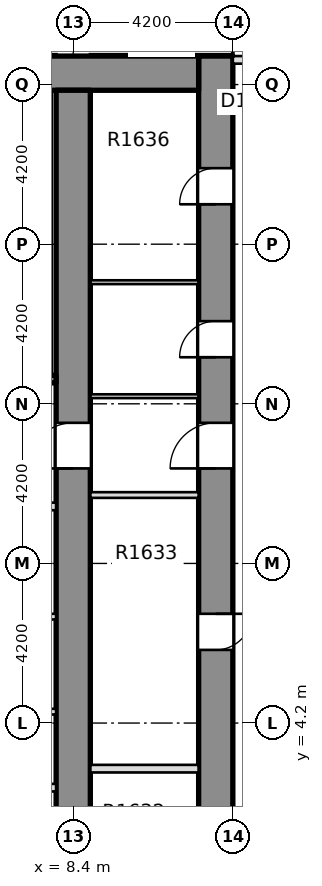
"""IFC4 building model, lengths in metres.
Left out: names, types, materials, properties, quantities, classifications, styles, units other than length and angle.
Written with IfcOpenShell. Run it as: python <this file> out.ifc"""

import sys

from ifc_helpers import new_model, si_unit, direction, frame, frame_2d, origin, place, context, subcontext, project, spatial, rectangle, extrude, element, fill, save


model = new_model("IFC4")
c1 = context("Model", 3, precision=1e-05, world=origin(), true_north=direction((0.0, 1.0)))
c2 = subcontext(c1, "Body", "Model", "MODEL_VIEW")
j1 = project(units=[si_unit("LENGTHUNIT", "METRE"), si_unit("PLANEANGLEUNIT", "RADIAN")], contexts=[c1])
p1 = place(None, origin())
s1 = spatial("IfcSite", under=j1, at=p1, CompositionType="ELEMENT")
p2 = place(p1, origin())
s2 = spatial("IfcBuilding", under=s1, at=p2, CompositionType="ELEMENT")
p3 = place(p2, frame((0.0, 0.0, 69.0)))
s3 = spatial("IfcBuildingStorey", under=s2, at=p3, CompositionType="ELEMENT", Elevation=69.0)
p4 = place(p3, frame((12.15, -8.4, -0.32), z_axis=(0.0, 0.0, 1.0), x_axis=(0.0, 1.0, 0.0)))
e1 = element("IfcWall", 1, at=p4, inside=s3, PredefinedType="SHEAR", context=c2, shape_type="SweptSolid", body=[
    extrude(rectangle(XDim=30.15, YDim=0.9, at=frame_2d((15.075, 0.0))), origin(), (0.0, 0.0, 1.0), 3.45),
])
p5 = place(p4, frame((3.925, 0.0, 0.32)))
e2 = element("IfcOpeningElement", 2, at=p5, cuts=e1, PredefinedType="OPENING", context=c2, shape_type="SweptSolid", body=[
    extrude(rectangle(XDim=0.95, YDim=2.1, at=frame_2d((0.475, 1.05))), frame((0.0, 0.46, 0.0), z_axis=(0.0, -1.0, 0.0), x_axis=(1.0, 0.0, 0.0)), (0.0, 0.0, 1.0), 0.92),
])
p6 = place(p4, frame((9.175, 0.0, 0.32)))
e3 = element("IfcOpeningElement", 3, at=p6, cuts=e1, PredefinedType="OPENING", context=c2, shape_type="SweptSolid", body=[
    extrude(rectangle(XDim=0.95, YDim=2.1, at=frame_2d((0.475, 1.05))), frame((0.0, 0.46, 0.0), z_axis=(0.0, -1.0, 0.0), x_axis=(1.0, 0.0, 0.0)), (0.0, 0.0, 1.0), 0.92),
])
p7 = place(p4, frame((14.525, 0.0, 0.32)))
e4 = element("IfcOpeningElement", 4, at=p7, cuts=e1, PredefinedType="OPENING", context=c2, shape_type="SweptSolid", body=[
    extrude(rectangle(XDim=0.95, YDim=2.1, at=frame_2d((0.475, 1.05))), frame((0.0, 0.46, 0.0), z_axis=(0.0, -1.0, 0.0), x_axis=(1.0, 0.0, 0.0)), (0.0, 0.0, 1.0), 0.92),
])
p8 = place(p4, frame((22.225, 0.0, 0.32)))
e5 = element("IfcOpeningElement", 5, at=p8, cuts=e1, PredefinedType="OPENING", context=c2, shape_type="SweptSolid", body=[
    extrude(rectangle(XDim=0.95, YDim=2.1, at=frame_2d((0.475, 1.05))), frame((0.0, 0.46, 0.0), z_axis=(0.0, -1.0, 0.0), x_axis=(1.0, 0.0, 0.0)), (0.0, 0.0, 1.0), 0.92),
])
p9 = place(p4, frame((26.25, 0.0, 0.32)))
e6 = element("IfcOpeningElement", 6, at=p9, cuts=e1, PredefinedType="OPENING", context=c2, shape_type="SweptSolid", body=[
    extrude(rectangle(XDim=0.95, YDim=2.1, at=frame_2d((0.475, 1.05))), frame((0.0, 0.46, 0.0), z_axis=(0.0, -1.0, 0.0), x_axis=(1.0, 0.0, 0.0)), (0.0, 0.0, 1.0), 0.92),
])
p10 = place(p4, frame((19.3, 0.0, 0.32)))
e7 = element("IfcOpeningElement", 7, at=p10, cuts=e1, PredefinedType="OPENING", context=c2, shape_type="SweptSolid", body=[
    extrude(rectangle(XDim=1.2, YDim=2.1, at=frame_2d((0.6, 1.05))), frame((0.0, 0.46, 0.0), z_axis=(0.0, -1.0, 0.0), x_axis=(1.0, 0.0, 0.0)), (0.0, 0.0, 1.0), 0.92),
])
p11 = place(p3, frame((-11.7, 21.3, -0.32), z_axis=(0.0, 0.0, 1.0), x_axis=(1.0, 0.0, 0.0)))
e8 = element("IfcWall", 8, at=p11, inside=s3, PredefinedType="SOLIDWALL", context=c2, shape_type="SweptSolid", body=[
    extrude(rectangle(XDim=23.4, YDim=0.9, at=frame_2d((11.7, 0.0))), origin(), (0.0, 0.0, 1.0), 3.45),
])
p12 = place(p3, frame((8.4, -7.5, -0.32), z_axis=(0.0, 0.0, 1.0), x_axis=(0.0, 1.0, 0.0)))
e9 = element("IfcWall", 9, at=p12, inside=s3, PredefinedType="SHEAR", context=c2, shape_type="SweptSolid", body=[
    extrude(rectangle(XDim=28.35, YDim=0.9, at=frame_2d((14.175, 0.0))), origin(), (0.0, 0.0, 1.0), 3.45),
])
p13 = place(p12, frame((18.4, 0.0, 0.32)))
e10 = element("IfcOpeningElement", 10, at=p13, cuts=e9, PredefinedType="OPENING", context=c2, shape_type="SweptSolid", body=[
    extrude(rectangle(XDim=1.2, YDim=2.1, at=frame_2d((0.6, 1.05))), frame((0.0, 0.46, 0.0), z_axis=(0.0, -1.0, 0.0), x_axis=(1.0, 0.0, 0.0)), (0.0, 0.0, 1.0), 0.92),
])
p14 = place(p3, frame((16.1, 21.65, 0.0), z_axis=(0.0, 0.0, 1.0), x_axis=(-1.0, 0.0, 0.0)))
e11 = element("IfcWall", 11, at=p14, inside=s3, PredefinedType="STANDARD", context=c2, shape_type="SweptSolid", body=[
    extrude(rectangle(XDim=3.5, YDim=0.2, at=frame_2d((1.75, 0.0))), origin(), (0.0, 0.0, 1.0), 3.13),
])
p15 = place(p14, frame((2.2, 0.0, 0.0)))
e12 = element("IfcOpeningElement", 12, at=p15, cuts=e11, PredefinedType="OPENING", context=c2, shape_type="SweptSolid", body=[
    extrude(rectangle(XDim=1.0, YDim=2.4, at=frame_2d((0.5, 1.2))), frame((0.0, 0.11, 0.0), z_axis=(0.0, -1.0, 0.0), x_axis=(1.0, 0.0, 0.0)), (0.0, 0.0, 1.0), 0.22),
])
p16 = place(p3, frame((5.575, 2.5, 0.0), z_axis=(0.0, 0.0, 1.0), x_axis=(1.0, 0.0, 0.0)))
e13 = element("IfcWall", 13, at=p16, inside=s3, PredefinedType="PARTITIONING", context=c2, shape_type="SweptSolid", body=[
    extrude(rectangle(XDim=2.374, YDim=0.2, at=frame_2d((1.187, 0.0))), origin(), (0.0, 0.0, 1.0), 3.13),
])
p17 = place(p3, frame((5.425, 4.5, 0.0), z_axis=(0.0, 0.0, 1.0), x_axis=(1.0, 0.0, 0.0)))
e14 = element("IfcWall", 14, at=p17, inside=s3, PredefinedType="PARTITIONING", context=c2, shape_type="SweptSolid", body=[
    extrude(rectangle(XDim=2.524, YDim=0.15, at=frame_2d((1.262, 0.0))), origin(), (0.0, 0.0, 1.0), 3.13),
])
p18 = place(p3, frame((-7.949, 7.0, 0.0), z_axis=(0.0, 0.0, 1.0), x_axis=(1.0, 0.0, 0.0)))
e15 = element("IfcWall", 15, at=p18, inside=s3, PredefinedType="PARTITIONING", context=c2, shape_type="SweptSolid", body=[
    extrude(rectangle(XDim=15.898, YDim=0.15, at=frame_2d((7.949, 0.0))), origin(), (0.0, 0.0, 1.0), 3.13),
])
p19 = place(p18, frame((7.249, 0.0, 0.0)))
e16 = element("IfcOpeningElement", 16, at=p19, cuts=e15, PredefinedType="OPENING", context=c2, shape_type="SweptSolid", body=[
    extrude(rectangle(XDim=1.4, YDim=2.1, at=frame_2d((0.7, 1.05))), frame((0.0, 0.085, 0.0), z_axis=(0.0, -1.0, 0.0), x_axis=(1.0, 0.0, 0.0)), (0.0, 0.0, 1.0), 0.17),
])
p20 = place(p3, frame((3.6, 9.9, 0.0), z_axis=(0.0, 0.0, 1.0), x_axis=(1.0, 0.0, 0.0)))
e17 = element("IfcWall", 17, at=p20, inside=s3, PredefinedType="PARTITIONING", context=c2, shape_type="SweptSolid", body=[
    extrude(rectangle(XDim=4.349, YDim=0.2, at=frame_2d((2.174, 0.0))), origin(), (0.0, 0.0, 1.0), 3.13),
])
p21 = place(p20, frame((2.25, 0.0, 0.0)))
e18 = element("IfcOpeningElement", 18, at=p21, cuts=e17, PredefinedType="OPENING", context=c2, shape_type="SweptSolid", body=[
    extrude(rectangle(XDim=1.1, YDim=2.1, at=frame_2d((0.55, 1.05))), frame((0.0, 0.11, 0.0), z_axis=(0.0, -1.0, 0.0), x_axis=(1.0, 0.0, 0.0)), (0.0, 0.0, 1.0), 0.22),
])
p22 = place(p3, frame((3.425, 13.25, 0.0), z_axis=(0.0, 0.0, 1.0), x_axis=(1.0, 0.0, 0.0)))
e19 = element("IfcWall", 19, at=p22, inside=s3, PredefinedType="SOLIDWALL", context=c2, shape_type="SweptSolid", body=[
    extrude(rectangle(XDim=4.524, YDim=0.2, at=frame_2d((2.262, 0.0))), origin(), (0.0, 0.0, 1.0), 3.13),
])
p23 = place(p22, frame((1.825, 0.0, 0.0)))
e20 = element("IfcOpeningElement", 20, at=p23, cuts=e19, PredefinedType="OPENING", context=c2, shape_type="SweptSolid", body=[
    extrude(rectangle(XDim=1.2, YDim=2.1, at=frame_2d((0.6, 1.05))), frame((0.0, 0.11, 0.0), z_axis=(0.0, -1.0, 0.0), x_axis=(1.0, 0.0, 0.0)), (0.0, 0.0, 1.0), 0.22),
])
p24 = place(p3, frame((8.851, 3.0, 0.0), z_axis=(0.0, 0.0, 1.0), x_axis=(1.0, 0.0, 0.0)))
e21 = element("IfcWall", 21, at=p24, inside=s3, PredefinedType="PARTITIONING", context=c2, shape_type="SweptSolid", body=[
    extrude(rectangle(XDim=2.848, YDim=0.2, at=frame_2d((1.424, 0.0))), origin(), (0.0, 0.0, 1.0), 3.13),
])
p25 = place(p3, frame((8.851, 10.2, 0.0), z_axis=(0.0, 0.0, 1.0), x_axis=(1.0, 0.0, 0.0)))
e22 = element("IfcWall", 22, at=p25, inside=s3, PredefinedType="PARTITIONING", context=c2, shape_type="SweptSolid", body=[
    extrude(rectangle(XDim=2.848, YDim=0.15, at=frame_2d((1.424, 0.0))), origin(), (0.0, 0.0, 1.0), 3.13),
])
for number, where, z_axis, x_axis in (
    (23, (8.851, 12.8, 0.0), (0.0, 0.0, 1.0), (1.0, 0.0, 0.0)),
    (24, (8.851, 15.8, 0.0), (0.0, 0.0, 1.0), (1.0, 0.0, 0.0)),
):
    element("IfcWall", number, at=place(p3, frame(where, z_axis=z_axis, x_axis=x_axis)), inside=s3, PredefinedType="PARTITIONING", context=c2, shape_type="SweptSolid", body=[
        extrude(rectangle(XDim=2.848, YDim=0.1, at=frame_2d((1.424, 0.0))), origin(), (0.0, 0.0, 1.0), 3.13),
    ])
p26 = place(p7, origin())
e25 = element("IfcDoor", 25, at=p26, inside=s3, OperationType="SINGLE_SWING_LEFT", PredefinedType="DOOR", context=c2, shape_type="SweptSolid", body=[
    extrude(rectangle(XDim=0.95, YDim=2.1, at=frame_2d((0.475, 1.05))), frame((0.0, 0.025, 0.0), z_axis=(0.0, -1.0, 0.0), x_axis=(1.0, 0.0, 0.0)), (0.0, 0.0, 1.0), 0.05),
])
fill(e4, e25)
p27 = place(p8, origin())
e26 = element("IfcDoor", 26, at=p27, inside=s3, OperationType="SINGLE_SWING_LEFT", PredefinedType="DOOR", context=c2, shape_type="SweptSolid", body=[
    extrude(rectangle(XDim=0.95, YDim=2.1, at=frame_2d((0.475, 1.05))), frame((0.0, 0.025, 0.0), z_axis=(0.0, -1.0, 0.0), x_axis=(1.0, 0.0, 0.0)), (0.0, 0.0, 1.0), 0.05),
])
fill(e5, e26)
p28 = place(p9, origin())
e27 = element("IfcDoor", 27, at=p28, inside=s3, OperationType="SINGLE_SWING_LEFT", PredefinedType="DOOR", context=c2, shape_type="SweptSolid", body=[
    extrude(rectangle(XDim=0.95, YDim=2.1, at=frame_2d((0.475, 1.05))), frame((0.0, 0.025, 0.0), z_axis=(0.0, -1.0, 0.0), x_axis=(1.0, 0.0, 0.0)), (0.0, 0.0, 1.0), 0.05),
])
fill(e6, e27)
p29 = place(p10, origin())
e28 = element("IfcDoor", 28, at=p29, inside=s3, OperationType="SINGLE_SWING_LEFT", PredefinedType="DOOR", context=c2, shape_type="SweptSolid", body=[
    extrude(rectangle(XDim=1.2, YDim=2.1, at=frame_2d((0.6, 1.05))), frame((0.0, 0.025, 0.0), z_axis=(0.0, -1.0, 0.0), x_axis=(1.0, 0.0, 0.0)), (0.0, 0.0, 1.0), 0.05),
])
fill(e7, e28)
p30 = place(p13, origin())
e29 = element("IfcDoor", 29, at=p30, inside=s3, OperationType="SINGLE_SWING_LEFT", PredefinedType="DOOR", context=c2, shape_type="SweptSolid", body=[
    extrude(rectangle(XDim=1.2, YDim=2.1, at=frame_2d((0.6, 1.05))), frame((0.0, 0.025, 0.0), z_axis=(0.0, -1.0, 0.0), x_axis=(1.0, 0.0, 0.0)), (0.0, 0.0, 1.0), 0.05),
])
fill(e10, e29)
save(model, sys.argv[1])
